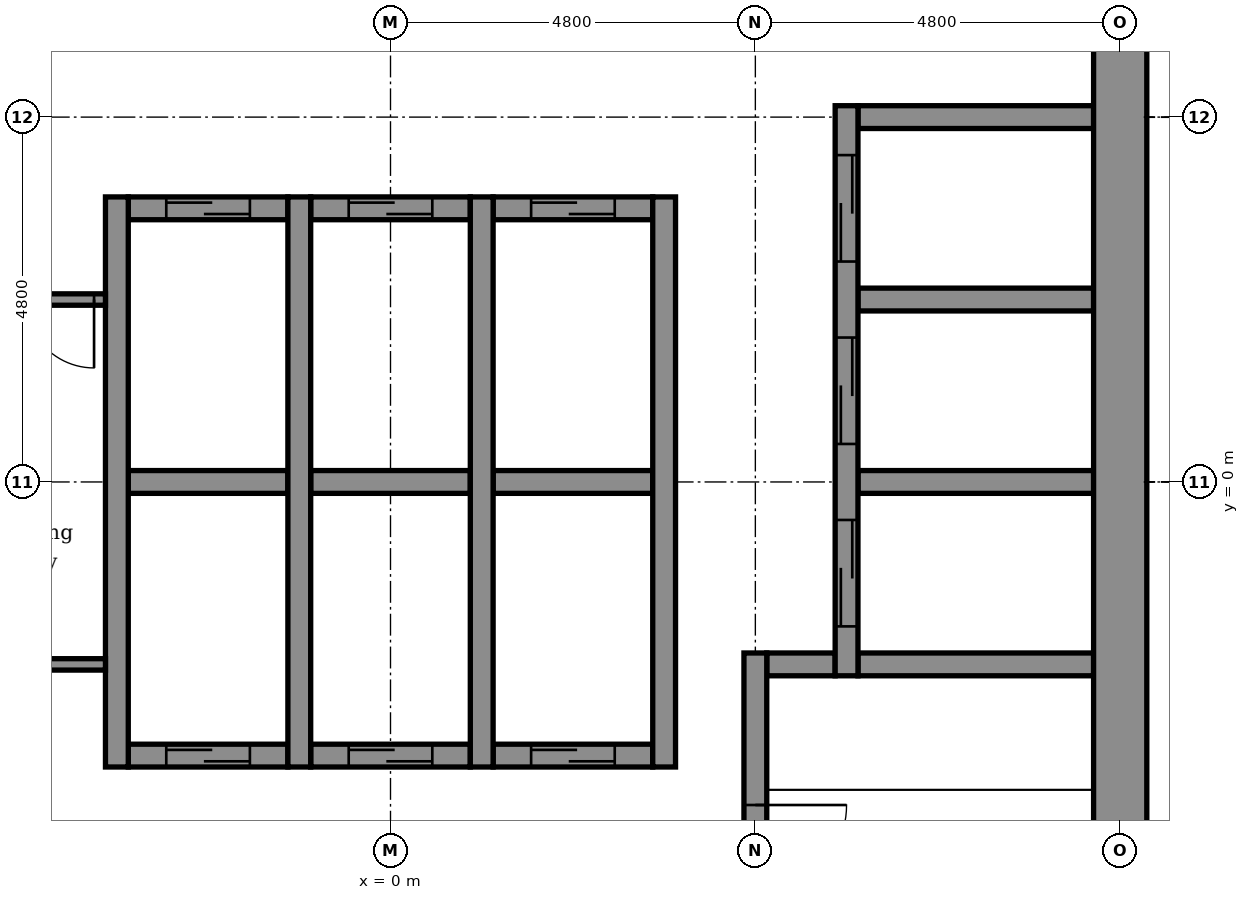
"""IFC4 building model, lengths in metres.
Left out: names, types, materials, properties, quantities, classifications, styles, units other than length and angle.
Written with IfcOpenShell. Run it as: python <this file> out.ifc"""

import sys

from ifc_helpers import new_model, si_unit, direction, frame, frame_2d, origin, place, context, subcontext, project, spatial, rectangle, extrude, element, fill, save


model = new_model("IFC4")
c1 = context("Model", 3, precision=1e-05, world=origin(), true_north=direction((0.0, 1.0)))
c2 = subcontext(c1, "Body", "Model", "MODEL_VIEW")
j1 = project(units=[si_unit("LENGTHUNIT", "METRE"), si_unit("PLANEANGLEUNIT", "RADIAN")], contexts=[c1])
p1 = place(None, origin())
s1 = spatial("IfcSite", under=j1, at=p1, CompositionType="ELEMENT")
p2 = place(p1, origin())
s2 = spatial("IfcBuilding", under=s1, at=p2, CompositionType="ELEMENT")
p3 = place(p2, frame((0.0, 0.0, 138.8)))
s3 = spatial("IfcBuildingStorey", under=s2, at=p3, CompositionType="ELEMENT", Elevation=138.8)
p4 = place(p3, frame((-3.45, -3.6, -0.15), z_axis=(0.0, 0.0, 1.0), x_axis=(1.0, 0.0, 0.0)))
e1 = element("IfcWall", 1, at=p4, inside=s3, PredefinedType="STANDARD", context=c2, shape_type="SweptSolid", body=[
    extrude(rectangle(XDim=2.1, YDim=0.3, at=frame_2d((1.05, 0.0))), origin(), (0.0, 0.0, 1.0), 3.9),
])
p5 = place(p4, frame((0.5, 0.0, 0.15)))
e2 = element("IfcOpeningElement", 2, at=p5, cuts=e1, PredefinedType="OPENING", context=c2, shape_type="SweptSolid", body=[
    extrude(rectangle(XDim=1.1, YDim=2.1, at=frame_2d((0.55, 1.05))), frame((0.0, 0.16, 0.0), z_axis=(0.0, -1.0, 0.0), x_axis=(1.0, 0.0, 0.0)), (0.0, 0.0, 1.0), 0.32),
])
p6 = place(p3, frame((-1.05, -3.6, -0.15), z_axis=(0.0, 0.0, 1.0), x_axis=(1.0, 0.0, 0.0)))
e3 = element("IfcWall", 3, at=p6, inside=s3, PredefinedType="STANDARD", context=c2, shape_type="SweptSolid", body=[
    extrude(rectangle(XDim=2.1, YDim=0.3, at=frame_2d((1.05, 0.0))), origin(), (0.0, 0.0, 1.0), 3.9),
])
p7 = place(p6, frame((0.5, 0.0, 0.15)))
e4 = element("IfcOpeningElement", 4, at=p7, cuts=e3, PredefinedType="OPENING", context=c2, shape_type="SweptSolid", body=[
    extrude(rectangle(XDim=1.1, YDim=2.1, at=frame_2d((0.55, 1.05))), frame((0.0, 0.16, 0.0), z_axis=(0.0, -1.0, 0.0), x_axis=(1.0, 0.0, 0.0)), (0.0, 0.0, 1.0), 0.32),
])
p8 = place(p3, frame((1.35, -3.6, -0.15), z_axis=(0.0, 0.0, 1.0), x_axis=(1.0, 0.0, 0.0)))
e5 = element("IfcWall", 5, at=p8, inside=s3, PredefinedType="STANDARD", context=c2, shape_type="SweptSolid", body=[
    extrude(rectangle(XDim=2.1, YDim=0.3, at=frame_2d((1.05, 0.0))), origin(), (0.0, 0.0, 1.0), 3.9),
])
p9 = place(p8, frame((0.5, 0.0, 0.15)))
e6 = element("IfcOpeningElement", 6, at=p9, cuts=e5, PredefinedType="OPENING", context=c2, shape_type="SweptSolid", body=[
    extrude(rectangle(XDim=1.1, YDim=2.1, at=frame_2d((0.55, 1.05))), frame((0.0, 0.16, 0.0), z_axis=(0.0, -1.0, 0.0), x_axis=(1.0, 0.0, 0.0)), (0.0, 0.0, 1.0), 0.32),
])
p10 = place(p3, frame((4.95, -2.4, -0.15), z_axis=(0.0, 0.0, 1.0), x_axis=(1.0, 0.0, 0.0)))
e7 = element("IfcWall", 7, at=p10, inside=s3, PredefinedType="STANDARD", context=c2, shape_type="SweptSolid", body=[
    extrude(rectangle(XDim=0.9, YDim=0.3, at=frame_2d((0.45, 0.0))), origin(), (0.0, 0.0, 1.0), 3.9),
])
p11 = place(p3, frame((6.15, -2.4, -0.15), z_axis=(0.0, 0.0, 1.0), x_axis=(1.0, 0.0, 0.0)))
e8 = element("IfcWall", 8, at=p11, inside=s3, PredefinedType="STANDARD", context=c2, shape_type="SweptSolid", body=[
    extrude(rectangle(XDim=3.1, YDim=0.3, at=frame_2d((1.55, 0.0))), origin(), (0.0, 0.0, 1.0), 3.9),
])
p12 = place(p3, frame((-3.45, 0.0, -0.15), z_axis=(0.0, 0.0, 1.0), x_axis=(1.0, 0.0, 0.0)))
e9 = element("IfcWall", 9, at=p12, inside=s3, PredefinedType="STANDARD", context=c2, shape_type="SweptSolid", body=[
    extrude(rectangle(XDim=2.1, YDim=0.3, at=frame_2d((1.05, 0.0))), origin(), (0.0, 0.0, 1.0), 3.9),
])
p13 = place(p3, frame((-1.05, 0.0, -0.15), z_axis=(0.0, 0.0, 1.0), x_axis=(1.0, 0.0, 0.0)))
e10 = element("IfcWall", 10, at=p13, inside=s3, PredefinedType="STANDARD", context=c2, shape_type="SweptSolid", body=[
    extrude(rectangle(XDim=2.1, YDim=0.3, at=frame_2d((1.05, 0.0))), origin(), (0.0, 0.0, 1.0), 3.9),
])
p14 = place(p3, frame((1.35, 0.0, -0.15), z_axis=(0.0, 0.0, 1.0), x_axis=(1.0, 0.0, 0.0)))
e11 = element("IfcWall", 11, at=p14, inside=s3, PredefinedType="STANDARD", context=c2, shape_type="SweptSolid", body=[
    extrude(rectangle(XDim=2.1, YDim=0.3, at=frame_2d((1.05, 0.0))), origin(), (0.0, 0.0, 1.0), 3.9),
])
for number, where, z_axis, x_axis in (
    (12, (6.15, 0.0, -0.15), (0.0, 0.0, 1.0), (1.0, 0.0, 0.0)),
    (13, (6.15, 2.4, -0.15), (0.0, 0.0, 1.0), (1.0, 0.0, 0.0)),
):
    element("IfcWall", number, at=place(p3, frame(where, z_axis=z_axis, x_axis=x_axis)), inside=s3, PredefinedType="STANDARD", context=c2, shape_type="SweptSolid", body=[
        extrude(rectangle(XDim=3.1, YDim=0.3, at=frame_2d((1.55, 0.0))), origin(), (0.0, 0.0, 1.0), 3.9),
    ])
p15 = place(p3, frame((-3.45, 3.6, -0.15), z_axis=(0.0, 0.0, 1.0), x_axis=(1.0, 0.0, 0.0)))
e14 = element("IfcWall", 14, at=p15, inside=s3, PredefinedType="STANDARD", context=c2, shape_type="SweptSolid", body=[
    extrude(rectangle(XDim=2.1, YDim=0.3, at=frame_2d((1.05, 0.0))), origin(), (0.0, 0.0, 1.0), 3.9),
])
p16 = place(p15, frame((0.5, 0.0, 0.15)))
e15 = element("IfcOpeningElement", 15, at=p16, cuts=e14, PredefinedType="OPENING", context=c2, shape_type="SweptSolid", body=[
    extrude(rectangle(XDim=1.1, YDim=2.1, at=frame_2d((0.55, 1.05))), frame((0.0, 0.16, 0.0), z_axis=(0.0, -1.0, 0.0), x_axis=(1.0, 0.0, 0.0)), (0.0, 0.0, 1.0), 0.32),
])
p17 = place(p3, frame((-1.05, 3.6, -0.15), z_axis=(0.0, 0.0, 1.0), x_axis=(1.0, 0.0, 0.0)))
e16 = element("IfcWall", 16, at=p17, inside=s3, PredefinedType="STANDARD", context=c2, shape_type="SweptSolid", body=[
    extrude(rectangle(XDim=2.1, YDim=0.3, at=frame_2d((1.05, 0.0))), origin(), (0.0, 0.0, 1.0), 3.9),
])
p18 = place(p17, frame((0.5, 0.0, 0.15)))
e17 = element("IfcOpeningElement", 17, at=p18, cuts=e16, PredefinedType="OPENING", context=c2, shape_type="SweptSolid", body=[
    extrude(rectangle(XDim=1.1, YDim=2.1, at=frame_2d((0.55, 1.05))), frame((0.0, 0.16, 0.0), z_axis=(0.0, -1.0, 0.0), x_axis=(1.0, 0.0, 0.0)), (0.0, 0.0, 1.0), 0.32),
])
p19 = place(p3, frame((1.35, 3.6, -0.15), z_axis=(0.0, 0.0, 1.0), x_axis=(1.0, 0.0, 0.0)))
e18 = element("IfcWall", 18, at=p19, inside=s3, PredefinedType="STANDARD", context=c2, shape_type="SweptSolid", body=[
    extrude(rectangle(XDim=2.1, YDim=0.3, at=frame_2d((1.05, 0.0))), origin(), (0.0, 0.0, 1.0), 3.9),
])
p20 = place(p19, frame((0.5, 0.0, 0.15)))
e19 = element("IfcOpeningElement", 19, at=p20, cuts=e18, PredefinedType="OPENING", context=c2, shape_type="SweptSolid", body=[
    extrude(rectangle(XDim=1.1, YDim=2.1, at=frame_2d((0.55, 1.05))), frame((0.0, 0.16, 0.0), z_axis=(0.0, -1.0, 0.0), x_axis=(1.0, 0.0, 0.0)), (0.0, 0.0, 1.0), 0.32),
])
p21 = place(p3, frame((6.15, 4.8, -0.15), z_axis=(0.0, 0.0, 1.0), x_axis=(1.0, 0.0, 0.0)))
e20 = element("IfcWall", 20, at=p21, inside=s3, PredefinedType="STANDARD", context=c2, shape_type="SweptSolid", body=[
    extrude(rectangle(XDim=3.1, YDim=0.3, at=frame_2d((1.55, 0.0))), origin(), (0.0, 0.0, 1.0), 3.9),
])
for number, where, z_axis, x_axis in (
    (21, (-3.6, -3.75, -0.15), (0.0, 0.0, 1.0), (0.0, 1.0, 0.0)),
    (22, (-1.2, -3.75, -0.15), (0.0, 0.0, 1.0), (0.0, 1.0, 0.0)),
    (23, (1.2, -3.75, -0.15), (0.0, 0.0, 1.0), (0.0, 1.0, 0.0)),
    (24, (3.6, -3.75, -0.15), (0.0, 0.0, 1.0), (0.0, 1.0, 0.0)),
):
    element("IfcWall", number, at=place(p3, frame(where, z_axis=z_axis, x_axis=x_axis)), inside=s3, PredefinedType="STANDARD", context=c2, shape_type="SweptSolid", body=[
        extrude(rectangle(XDim=7.5, YDim=0.3, at=frame_2d((3.75, 0.0))), origin(), (0.0, 0.0, 1.0), 3.9),
    ])
p22 = place(p3, frame((4.8, -9.25, -0.15), z_axis=(0.0, 0.0, 1.0), x_axis=(0.0, 1.0, 0.0)))
e25 = element("IfcWall", 25, at=p22, inside=s3, PredefinedType="STANDARD", context=c2, shape_type="SweptSolid", body=[
    extrude(rectangle(XDim=7.0, YDim=0.3, at=frame_2d((3.5, 0.0))), origin(), (0.0, 0.0, 1.0), 3.9),
])
p23 = place(p22, frame((3.8, 0.0, 0.15)))
e26 = element("IfcOpeningElement", 26, at=p23, cuts=e25, PredefinedType="OPENING", context=c2, shape_type="SweptSolid", body=[
    extrude(rectangle(XDim=1.2, YDim=2.1, at=frame_2d((0.6, 1.05))), frame((0.0, 0.16, 0.0), z_axis=(0.0, -1.0, 0.0), x_axis=(1.0, 0.0, 0.0)), (0.0, 0.0, 1.0), 0.32),
])
p24 = place(p3, frame((6.0, -2.55, -0.15), z_axis=(0.0, 0.0, 1.0), x_axis=(0.0, 1.0, 0.0)))
e27 = element("IfcWall", 27, at=p24, inside=s3, PredefinedType="STANDARD", context=c2, shape_type="SweptSolid", body=[
    extrude(rectangle(XDim=7.5, YDim=0.3, at=frame_2d((3.75, 0.0))), origin(), (0.0, 0.0, 1.0), 3.9),
])
p25 = place(p24, frame((0.65, 0.0, 0.15)))
e28 = element("IfcOpeningElement", 28, at=p25, cuts=e27, PredefinedType="OPENING", context=c2, shape_type="SweptSolid", body=[
    extrude(rectangle(XDim=1.4, YDim=2.1, at=frame_2d((0.7, 1.05))), frame((0.0, 0.16, 0.0), z_axis=(0.0, -1.0, 0.0), x_axis=(1.0, 0.0, 0.0)), (0.0, 0.0, 1.0), 0.32),
])
p26 = place(p24, frame((3.05, 0.0, 0.15)))
e29 = element("IfcOpeningElement", 29, at=p26, cuts=e27, PredefinedType="OPENING", context=c2, shape_type="SweptSolid", body=[
    extrude(rectangle(XDim=1.4, YDim=2.1, at=frame_2d((0.7, 1.05))), frame((0.0, 0.16, 0.0), z_axis=(0.0, -1.0, 0.0), x_axis=(1.0, 0.0, 0.0)), (0.0, 0.0, 1.0), 0.32),
])
p27 = place(p24, frame((5.45, 0.0, 0.15)))
e30 = element("IfcOpeningElement", 30, at=p27, cuts=e27, PredefinedType="OPENING", context=c2, shape_type="SweptSolid", body=[
    extrude(rectangle(XDim=1.4, YDim=2.1, at=frame_2d((0.7, 1.05))), frame((0.0, 0.16, 0.0), z_axis=(0.0, -1.0, 0.0), x_axis=(1.0, 0.0, 0.0)), (0.0, 0.0, 1.0), 0.32),
])
p28 = place(p3, frame((9.6, -10.15, -0.15), z_axis=(0.0, 0.0, 1.0), x_axis=(0.0, 1.0, 0.0)))
e31 = element("IfcWall", 31, at=p28, inside=s3, PredefinedType="SHEAR", context=c2, shape_type="SweptSolid", body=[
    extrude(rectangle(XDim=20.1, YDim=0.7, at=frame_2d((10.05, 0.0))), origin(), (0.0, 0.0, 1.0), 3.9),
])
p29 = place(p3, frame((-4.95, 2.4, 0.0), z_axis=(0.0, 0.0, 1.0), x_axis=(1.0, 0.0, 0.0)))
e32 = element("IfcWall", 32, at=p29, inside=s3, PredefinedType="PARTITIONING", context=c2, shape_type="SweptSolid", body=[
    extrude(rectangle(XDim=1.2, YDim=0.15, at=frame_2d((0.6, 0.0))), origin(), (0.0, 0.0, 1.0), 3.75),
])
p30 = place(p29, frame((0.15, 0.0, 0.0)))
e33 = element("IfcOpeningElement", 33, at=p30, cuts=e32, PredefinedType="OPENING", context=c2, shape_type="SweptSolid", body=[
    extrude(rectangle(XDim=0.9, YDim=2.1, at=frame_2d((0.45, 1.05))), frame((0.0, 0.085, 0.0), z_axis=(0.0, -1.0, 0.0), x_axis=(1.0, 0.0, 0.0)), (0.0, 0.0, 1.0), 0.17),
])
p31 = place(p3, frame((-4.95, -2.4, 0.0), z_axis=(0.0, 0.0, 1.0), x_axis=(1.0, 0.0, 0.0)))
e34 = element("IfcWall", 34, at=p31, inside=s3, PredefinedType="PARTITIONING", context=c2, shape_type="SweptSolid", body=[
    extrude(rectangle(XDim=1.2, YDim=0.15, at=frame_2d((0.6, 0.0))), origin(), (0.0, 0.0, 1.0), 3.75),
])
p32 = place(p25, origin())
e35 = element("IfcDoor", 35, at=p32, inside=s3, OperationType="DOUBLE_DOOR_SLIDING", PredefinedType="DOOR", context=c2, shape_type="SweptSolid", body=[
    extrude(rectangle(XDim=1.4, YDim=2.1, at=frame_2d((0.7, 1.05))), frame((0.0, 0.025, 0.0), z_axis=(0.0, -1.0, 0.0), x_axis=(1.0, 0.0, 0.0)), (0.0, 0.0, 1.0), 0.05),
])
fill(e28, e35)
p33 = place(p26, origin())
e36 = element("IfcDoor", 36, at=p33, inside=s3, OperationType="DOUBLE_DOOR_SLIDING", PredefinedType="DOOR", context=c2, shape_type="SweptSolid", body=[
    extrude(rectangle(XDim=1.4, YDim=2.1, at=frame_2d((0.7, 1.05))), frame((0.0, 0.025, 0.0), z_axis=(0.0, -1.0, 0.0), x_axis=(1.0, 0.0, 0.0)), (0.0, 0.0, 1.0), 0.05),
])
fill(e29, e36)
p34 = place(p27, origin())
e37 = element("IfcDoor", 37, at=p34, inside=s3, OperationType="DOUBLE_DOOR_SLIDING", PredefinedType="DOOR", context=c2, shape_type="SweptSolid", body=[
    extrude(rectangle(XDim=1.4, YDim=2.1, at=frame_2d((0.7, 1.05))), frame((0.0, 0.025, 0.0), z_axis=(0.0, -1.0, 0.0), x_axis=(1.0, 0.0, 0.0)), (0.0, 0.0, 1.0), 0.05),
])
fill(e30, e37)
p35 = place(p16, origin())
e38 = element("IfcDoor", 38, at=p35, inside=s3, OperationType="DOUBLE_DOOR_SLIDING", PredefinedType="DOOR", context=c2, shape_type="SweptSolid", body=[
    extrude(rectangle(XDim=1.1, YDim=2.1, at=frame_2d((0.55, 1.05))), frame((0.0, 0.025, 0.0), z_axis=(0.0, -1.0, 0.0), x_axis=(1.0, 0.0, 0.0)), (0.0, 0.0, 1.0), 0.05),
])
fill(e15, e38)
p36 = place(p18, origin())
e39 = element("IfcDoor", 39, at=p36, inside=s3, OperationType="DOUBLE_DOOR_SLIDING", PredefinedType="DOOR", context=c2, shape_type="SweptSolid", body=[
    extrude(rectangle(XDim=1.1, YDim=2.1, at=frame_2d((0.55, 1.05))), frame((0.0, 0.025, 0.0), z_axis=(0.0, -1.0, 0.0), x_axis=(1.0, 0.0, 0.0)), (0.0, 0.0, 1.0), 0.05),
])
fill(e17, e39)
p37 = place(p20, origin())
e40 = element("IfcDoor", 40, at=p37, inside=s3, OperationType="DOUBLE_DOOR_SLIDING", PredefinedType="DOOR", context=c2, shape_type="SweptSolid", body=[
    extrude(rectangle(XDim=1.1, YDim=2.1, at=frame_2d((0.55, 1.05))), frame((0.0, 0.025, 0.0), z_axis=(0.0, -1.0, 0.0), x_axis=(1.0, 0.0, 0.0)), (0.0, 0.0, 1.0), 0.05),
])
fill(e19, e40)
p38 = place(p5, origin())
e41 = element("IfcDoor", 41, at=p38, inside=s3, OperationType="DOUBLE_DOOR_SLIDING", PredefinedType="DOOR", context=c2, shape_type="SweptSolid", body=[
    extrude(rectangle(XDim=1.1, YDim=2.1, at=frame_2d((0.55, 1.05))), frame((0.0, 0.025, 0.0), z_axis=(0.0, -1.0, 0.0), x_axis=(1.0, 0.0, 0.0)), (0.0, 0.0, 1.0), 0.05),
])
fill(e2, e41)
p39 = place(p7, origin())
e42 = element("IfcDoor", 42, at=p39, inside=s3, OperationType="DOUBLE_DOOR_SLIDING", PredefinedType="DOOR", context=c2, shape_type="SweptSolid", body=[
    extrude(rectangle(XDim=1.1, YDim=2.1, at=frame_2d((0.55, 1.05))), frame((0.0, 0.025, 0.0), z_axis=(0.0, -1.0, 0.0), x_axis=(1.0, 0.0, 0.0)), (0.0, 0.0, 1.0), 0.05),
])
fill(e4, e42)
p40 = place(p9, origin())
e43 = element("IfcDoor", 43, at=p40, inside=s3, OperationType="DOUBLE_DOOR_SLIDING", PredefinedType="DOOR", context=c2, shape_type="SweptSolid", body=[
    extrude(rectangle(XDim=1.1, YDim=2.1, at=frame_2d((0.55, 1.05))), frame((0.0, 0.025, 0.0), z_axis=(0.0, -1.0, 0.0), x_axis=(1.0, 0.0, 0.0)), (0.0, 0.0, 1.0), 0.05),
])
fill(e6, e43)
p41 = place(p23, frame((1.2, 0.0, 0.0), z_axis=(0.0, 0.0, 1.0), x_axis=(-1.0, 0.0, 0.0)))
e44 = element("IfcDoor", 44, at=p41, inside=s3, OperationType="SINGLE_SWING_RIGHT", PredefinedType="DOOR", context=c2, shape_type="SweptSolid", body=[
    extrude(rectangle(XDim=1.2, YDim=2.1, at=frame_2d((0.6, 1.05))), frame((0.0, 0.025, 0.0), z_axis=(0.0, -1.0, 0.0), x_axis=(1.0, 0.0, 0.0)), (0.0, 0.0, 1.0), 0.05),
])
fill(e26, e44)
p42 = place(p30, frame((0.9, 0.0, 0.0), z_axis=(0.0, 0.0, 1.0), x_axis=(-1.0, 0.0, 0.0)))
e45 = element("IfcDoor", 45, at=p42, inside=s3, OperationType="SINGLE_SWING_RIGHT", PredefinedType="DOOR", context=c2, shape_type="SweptSolid", body=[
    extrude(rectangle(XDim=0.9, YDim=2.1, at=frame_2d((0.45, 1.05))), frame((0.0, 0.025, 0.0), z_axis=(0.0, -1.0, 0.0), x_axis=(1.0, 0.0, 0.0)), (0.0, 0.0, 1.0), 0.05),
])
fill(e33, e45)
save(model, sys.argv[1])
